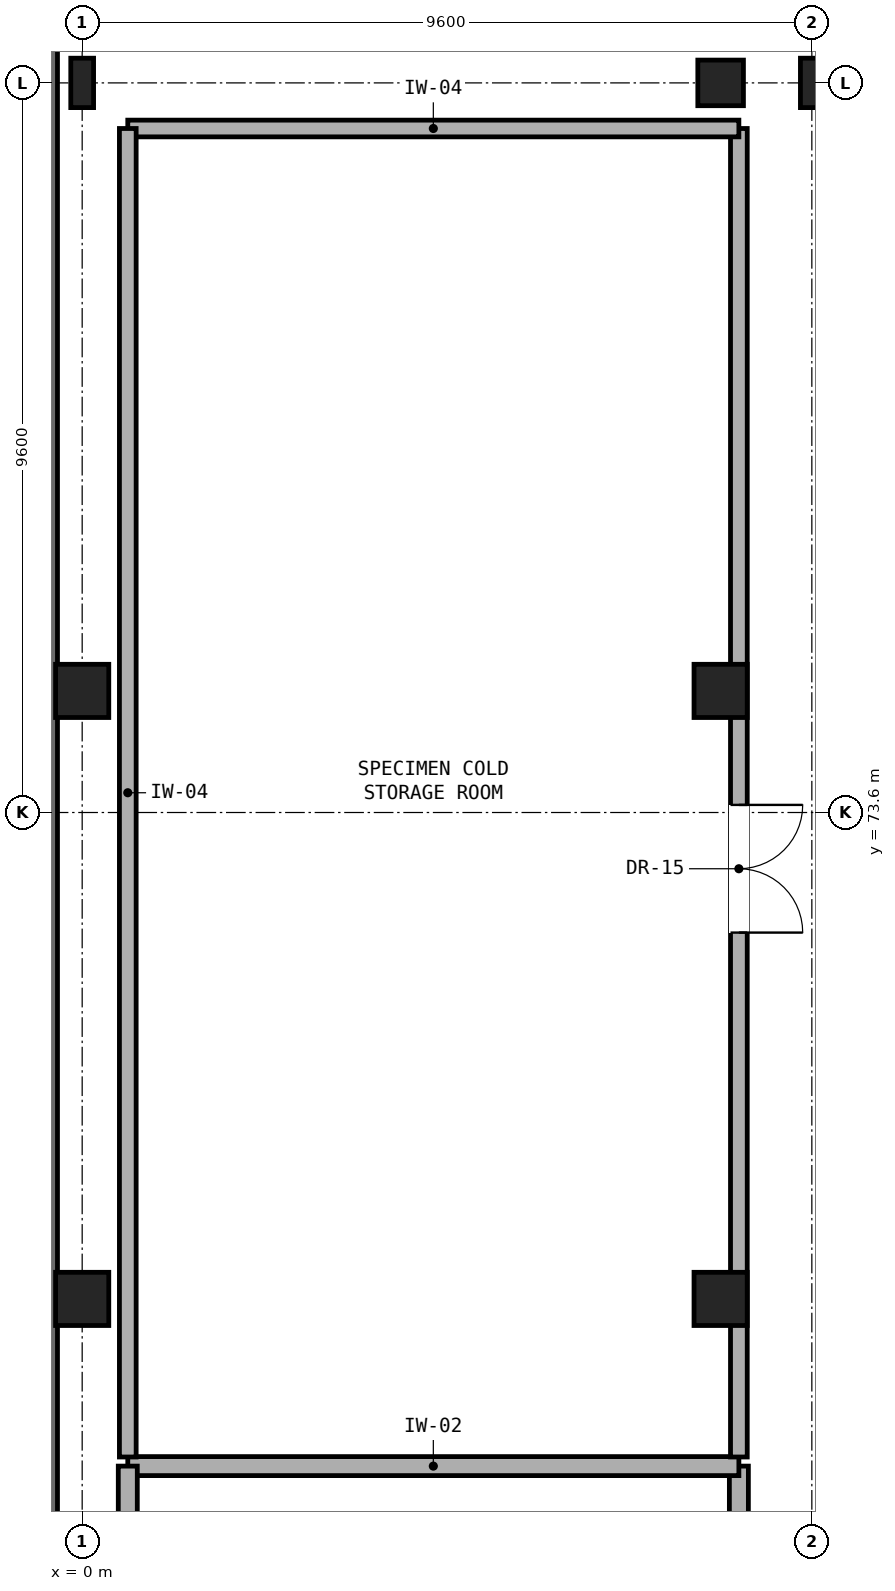
"""IFC4 building model, lengths in metres.
Left out: names, types, materials, properties, quantities, classifications, styles, units other than length and angle.
Written with IfcOpenShell. Run it as: python <this file> out.ifc"""

import sys

from ifc_helpers import new_model, si_unit, direction, frame, frame_2d, origin, origin_2d, place, context, subcontext, project, spatial, rectangle, i_section, extrude, element, fill, save


model = new_model("IFC4")
c1 = context("Model", 3, precision=1e-05, world=origin(), true_north=direction((0.0, 1.0)))
c2 = subcontext(c1, "Body", "Model", "MODEL_VIEW")
j1 = project(units=[si_unit("LENGTHUNIT", "METRE"), si_unit("PLANEANGLEUNIT", "RADIAN")], contexts=[c1])
p1 = place(None, origin())
s1 = spatial("IfcSite", under=j1, at=p1, CompositionType="ELEMENT")
p2 = place(p1, origin())
s2 = spatial("IfcBuilding", under=s1, at=p2, CompositionType="ELEMENT")
p3 = place(p2, frame((0.0, 0.0, -9.8)))
s3 = spatial("IfcBuildingStorey", under=s2, at=p3, CompositionType="ELEMENT", Elevation=-9.8)
for number, where, z_axis, x_axis in (
    (1, (0.0, 83.2, 0.0), (0.0, 0.0, 1.0), (1.0, 0.0, 0.0)),
    (2, (9.6, 83.2, 0.0), (0.0, 0.0, 1.0), (1.0, 0.0, 0.0)),
):
    element("IfcColumn", number, at=place(p3, frame(where, z_axis=z_axis, x_axis=x_axis)), inside=s3, PredefinedType="COLUMN", context=c2, shape_type="SweptSolid", body=[
        extrude(i_section(OverallWidth=0.3, OverallDepth=0.65, WebThickness=0.016, FlangeThickness=0.031, FilletRadius=0.027, at=origin_2d()), origin(), (0.0, 0.0, 1.0), 5.25),
    ])
for number, where, z_axis, x_axis in (
    (3, (0.0, 67.2, 0.0), (0.0, 0.0, 1.0), (1.0, 0.0, 0.0)),
    (4, (8.4, 67.2, 0.0), (0.0, 0.0, 1.0), (1.0, 0.0, 0.0)),
    (5, (0.0, 75.2, 0.0), (0.0, 0.0, 1.0), (1.0, 0.0, 0.0)),
    (6, (8.4, 75.2, 0.0), (0.0, 0.0, 1.0), (1.0, 0.0, 0.0)),
):
    element("IfcColumn", number, at=place(p3, frame(where, z_axis=z_axis, x_axis=x_axis)), inside=s3, PredefinedType="COLUMN", context=c2, shape_type="SweptSolid", body=[
        extrude(rectangle(XDim=0.7, YDim=0.7, at=origin_2d()), origin(), (0.0, 0.0, 1.0), 5.25),
    ])
p4 = place(p3, frame((8.4, 83.2, 0.0), z_axis=(0.0, 0.0, 1.0), x_axis=(1.0, 0.0, 0.0)))
e7 = element("IfcColumn", 7, at=p4, inside=s3, PredefinedType="COLUMN", context=c2, shape_type="SweptSolid", body=[
    extrude(rectangle(XDim=0.6, YDim=0.6, at=origin_2d()), origin(), (0.0, 0.0, 1.0), 5.25),
])
p5 = place(p3, frame((-0.55, 28.25, 0.0), z_axis=(0.0, 0.0, 1.0), x_axis=(0.0, 1.0, 0.0)))
e8 = element("IfcWall", 8, at=p5, inside=s3, PredefinedType="USERDEFINED", context=c2, shape_type="SweptSolid", body=[
    extrude(rectangle(XDim=89.1, YDim=0.45, at=frame_2d((44.55, 0.0))), origin(), (0.0, 0.0, 1.0), 5.25),
])
p6 = place(p3, frame((8.64, 48.25, 0.0), z_axis=(0.0, 0.0, 1.0), x_axis=(0.0, 1.0, 0.0)))
e9 = element("IfcWall", 9, at=p6, inside=s3, PredefinedType="SOLIDWALL", context=c2, shape_type="SweptSolid", body=[
    extrude(rectangle(XDim=16.75, YDim=0.25, at=frame_2d((8.375, 0.0))), origin(), (0.0, 0.0, 1.0), 4.51),
])
p7 = place(p6, frame((6.5, 0.0, 0.0)))
e10 = element("IfcOpeningElement", 10, at=p7, cuts=e9, PredefinedType="OPENING", context=c2, shape_type="SweptSolid", body=[
    extrude(rectangle(XDim=1.25, YDim=2.15, at=frame_2d((0.625, 1.075))), frame((0.0, 0.135, 0.0), z_axis=(0.0, -1.0, 0.0), x_axis=(1.0, 0.0, 0.0)), (0.0, 0.0, 1.0), 0.27),
])
p8 = place(p3, frame((8.64, 65.0, 0.0), z_axis=(0.0, 0.0, 1.0), x_axis=(-1.0, 0.0, 0.0)))
e11 = element("IfcWall", 11, at=p8, inside=s3, PredefinedType="SOLIDWALL", context=c2, shape_type="SweptSolid", body=[
    extrude(rectangle(XDim=8.04, YDim=0.25, at=frame_2d((4.02, 0.0))), origin(), (0.0, 0.0, 1.0), 4.97),
])
p9 = place(p3, frame((0.6, 65.0, 0.0), z_axis=(0.0, 0.0, 1.0), x_axis=(0.0, -1.0, 0.0)))
e12 = element("IfcWall", 12, at=p9, inside=s3, PredefinedType="SOLIDWALL", context=c2, shape_type="SweptSolid", body=[
    extrude(rectangle(XDim=16.75, YDim=0.25, at=frame_2d((8.375, 0.0))), origin(), (0.0, 0.0, 1.0), 4.97),
])
p10 = place(p3, frame((8.64, 65.12, 0.0), z_axis=(0.0, 0.0, 1.0), x_axis=(0.0, 1.0, 0.0)))
e13 = element("IfcWall", 13, at=p10, inside=s3, PredefinedType="PARTITIONING", context=c2, shape_type="SweptSolid", body=[
    extrude(rectangle(XDim=17.48, YDim=0.22, at=frame_2d((8.74, 0.0))), origin(), (0.0, 0.0, 1.0), 4.51),
])
p11 = place(p10, frame((6.9, 0.0, 0.0)))
e14 = element("IfcOpeningElement", 14, at=p11, cuts=e13, PredefinedType="OPENING", context=c2, shape_type="SweptSolid", body=[
    extrude(rectangle(XDim=1.68, YDim=2.2, at=frame_2d((0.84, 1.1))), frame((0.0, 0.12, 0.0), z_axis=(0.0, -1.0, 0.0), x_axis=(1.0, 0.0, 0.0)), (0.0, 0.0, 1.0), 0.24),
])
p12 = place(p3, frame((8.64, 82.6, 0.0), z_axis=(0.0, 0.0, 1.0), x_axis=(-1.0, 0.0, 0.0)))
e15 = element("IfcWall", 15, at=p12, inside=s3, PredefinedType="PARTITIONING", context=c2, shape_type="SweptSolid", body=[
    extrude(rectangle(XDim=8.04, YDim=0.22, at=frame_2d((4.02, 0.0))), origin(), (0.0, 0.0, 1.0), 4.97),
])
p13 = place(p3, frame((0.6, 82.6, 0.0), z_axis=(0.0, 0.0, 1.0), x_axis=(0.0, -1.0, 0.0)))
e16 = element("IfcWall", 16, at=p13, inside=s3, PredefinedType="PARTITIONING", context=c2, shape_type="SweptSolid", body=[
    extrude(rectangle(XDim=17.48, YDim=0.22, at=frame_2d((8.74, 0.0))), origin(), (0.0, 0.0, 1.0), 4.97),
])
p14 = place(p11, frame((1.68, 0.0, 0.0), z_axis=(0.0, 0.0, 1.0), x_axis=(-1.0, 0.0, 0.0)))
e17 = element("IfcDoor", 17, at=p14, inside=s3, OperationType="DOUBLE_DOOR_SINGLE_SWING", PredefinedType="DOOR", context=c2, shape_type="SweptSolid", body=[
    extrude(rectangle(XDim=1.68, YDim=2.2, at=frame_2d((0.84, 1.1))), frame((0.0, 0.025, 0.0), z_axis=(0.0, -1.0, 0.0), x_axis=(1.0, 0.0, 0.0)), (0.0, 0.0, 1.0), 0.05),
])
fill(e14, e17)
save(model, sys.argv[1])
